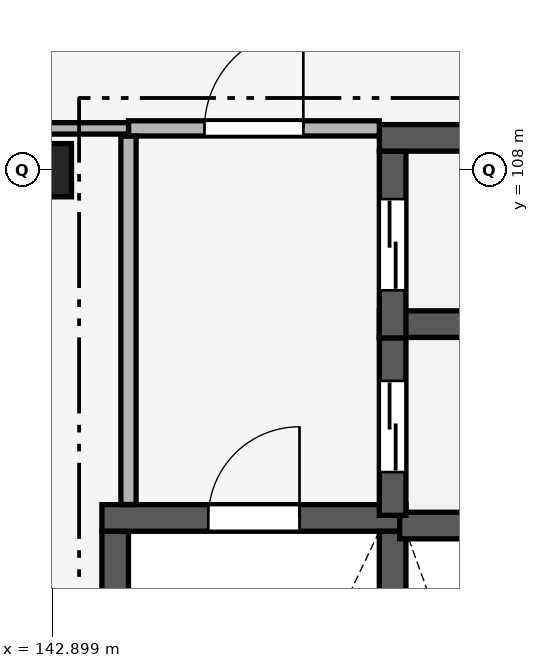
"""IFC4 building model, lengths in metres.
Left out: names, types, materials, properties, quantities, classifications, styles, units other than length and angle.
Written with IfcOpenShell. Run it as: python <this file> out.ifc"""

import sys

from ifc_helpers import new_model, si_unit, direction, frame, frame_2d, origin, origin_2d, place, context, subcontext, project, spatial, rectangle, extrude, element, fill, save


model = new_model("IFC4")
c1 = context("Model", 3, precision=1e-05, world=origin(), true_north=direction((0.0, 1.0)))
c2 = subcontext(c1, "Body", "Model", "MODEL_VIEW")
j1 = project(units=[si_unit("LENGTHUNIT", "METRE"), si_unit("PLANEANGLEUNIT", "RADIAN")], contexts=[c1])
p1 = place(None, origin())
s1 = spatial("IfcSite", under=j1, at=p1, CompositionType="ELEMENT")
p2 = place(p1, origin())
s2 = spatial("IfcBuilding", under=s1, at=p2, CompositionType="ELEMENT")
p3 = place(p2, frame((0.0, 0.0, 25.2)))
s3 = spatial("IfcBuildingStorey", under=s2, at=p3, CompositionType="ELEMENT", Elevation=25.2)
p4 = place(p3, frame((142.8, 108.0, 0.0), z_axis=(0.0, 0.0, 1.0), x_axis=(1.0, 0.0, 0.0)))
e1 = element("IfcColumn", 1, at=p4, inside=s3, PredefinedType="COLUMN", context=c2, shape_type="SweptSolid", body=[
    extrude(rectangle(XDim=0.7, YDim=0.7, at=origin_2d()), origin(), (0.0, 0.0, 1.0), 4.2),
])
p5 = place(p3, frame((143.55, 103.425, 0.0), z_axis=(0.0, 0.0, 1.0), x_axis=(1.0, 0.0, 0.0)))
e2 = element("IfcWall", 2, at=p5, inside=s3, PredefinedType="SHEAR", context=c2, shape_type="SweptSolid", body=[
    extrude(rectangle(XDim=4.0, YDim=0.35, at=frame_2d((2.0, 0.0))), origin(), (0.0, 0.0, 1.0), 3.95),
])
p6 = place(p5, frame((1.4, 0.0, 0.0)))
e3 = element("IfcOpeningElement", 3, at=p6, cuts=e2, PredefinedType="OPENING", context=c2, shape_type="SweptSolid", body=[
    extrude(rectangle(XDim=1.2, YDim=2.2, at=frame_2d((0.6, 1.1))), frame((0.0, 0.19, 0.0), z_axis=(0.0, -1.0, 0.0), x_axis=(1.0, 0.0, 0.0)), (0.0, 0.0, 1.0), 0.38),
])
for number, where, z_axis, x_axis in (
    (4, (143.725, 96.352, 0.0), (0.0, 0.0, 1.0), (0.0, 1.0, 0.0)),
    (5, (147.375, 96.352, 0.0), (0.0, 0.0, 1.0), (0.0, 1.0, 0.0)),
):
    element("IfcWall", number, at=place(p3, frame(where, z_axis=z_axis, x_axis=x_axis)), inside=s3, PredefinedType="SHEAR", context=c2, shape_type="SweptSolid", body=[
        extrude(rectangle(XDim=6.896, YDim=0.35, at=frame_2d((3.448, 0.0))), origin(), (0.0, 0.0, 1.0), 3.95),
    ])
p7 = place(p3, frame((147.468, 103.325, 0.0), z_axis=(0.0, 0.0, 1.0), x_axis=(1.0, 0.0, 0.0)))
e6 = element("IfcWall", 6, at=p7, inside=s3, PredefinedType="SHEAR", context=c2, shape_type="SweptSolid", body=[
    extrude(rectangle(XDim=2.932, YDim=0.35, at=frame_2d((1.466, 0.0))), origin(), (0.0, 0.0, 1.0), 3.95),
])
p8 = place(p3, frame((147.2, 105.975, 0.0), z_axis=(0.0, 0.0, 1.0), x_axis=(1.0, 0.0, 0.0)))
e7 = element("IfcWall", 7, at=p8, inside=s3, PredefinedType="SHEAR", context=c2, shape_type="SweptSolid", body=[
    extrude(rectangle(XDim=3.2, YDim=0.35, at=frame_2d((1.6, 0.0))), origin(), (0.0, 0.0, 1.0), 3.95),
])
p9 = place(p3, frame((147.375, 103.459, 0.0), z_axis=(0.0, 0.0, 1.0), x_axis=(0.0, 1.0, 0.0)))
e8 = element("IfcWall", 8, at=p9, inside=s3, PredefinedType="SHEAR", context=c2, shape_type="SweptSolid", body=[
    extrude(rectangle(XDim=2.339, YDim=0.35, at=frame_2d((1.169, 0.0))), origin(), (0.0, 0.0, 1.0), 3.95),
])
p10 = place(p9, frame((0.569, 0.0, 0.0)))
e9 = element("IfcOpeningElement", 9, at=p10, cuts=e8, PredefinedType="OPENING", context=c2, shape_type="SweptSolid", body=[
    extrude(rectangle(XDim=1.2, YDim=2.15, at=frame_2d((0.6, 1.075))), frame((0.0, 0.19, 0.0), z_axis=(0.0, -1.0, 0.0), x_axis=(1.0, 0.0, 0.0)), (0.0, 0.0, 1.0), 0.38),
])
p11 = place(p3, frame((147.2, 108.425, 0.0), z_axis=(0.0, 0.0, 1.0), x_axis=(1.0, 0.0, 0.0)))
e10 = element("IfcWall", 10, at=p11, inside=s3, PredefinedType="SHEAR", context=c2, shape_type="SweptSolid", body=[
    extrude(rectangle(XDim=3.661, YDim=0.35, at=frame_2d((1.831, 0.0))), origin(), (0.0, 0.0, 1.0), 3.95),
])
p12 = place(p3, frame((147.375, 105.793, 0.0), z_axis=(0.0, 0.0, 1.0), x_axis=(0.0, 1.0, 0.0)))
e11 = element("IfcWall", 11, at=p12, inside=s3, PredefinedType="SHEAR", context=c2, shape_type="SweptSolid", body=[
    extrude(rectangle(XDim=2.455, YDim=0.35, at=frame_2d((1.228, 0.0))), origin(), (0.0, 0.0, 1.0), 3.95),
])
p13 = place(p12, frame((0.627, 0.0, 0.0)))
e12 = element("IfcOpeningElement", 12, at=p13, cuts=e11, PredefinedType="OPENING", context=c2, shape_type="SweptSolid", body=[
    extrude(rectangle(XDim=1.2, YDim=2.15, at=frame_2d((0.6, 1.075))), frame((0.0, 0.19, 0.0), z_axis=(0.0, -1.0, 0.0), x_axis=(1.0, 0.0, 0.0)), (0.0, 0.0, 1.0), 0.38),
])
p14 = place(p3, frame((143.9, 108.55, 0.0), z_axis=(0.0, 0.0, 1.0), x_axis=(1.0, 0.0, 0.0)))
e13 = element("IfcWall", 13, at=p14, inside=s3, PredefinedType="PARTITIONING", context=c2, shape_type="SweptSolid", body=[
    extrude(rectangle(XDim=3.3, YDim=0.2, at=frame_2d((1.65, 0.0))), origin(), (0.0, 0.0, 1.0), 3.95),
])
p15 = place(p14, frame((1.0, 0.0, 0.0)))
e14 = element("IfcOpeningElement", 14, at=p15, cuts=e13, PredefinedType="OPENING", context=c2, shape_type="SweptSolid", body=[
    extrude(rectangle(XDim=1.3, YDim=2.2, at=frame_2d((0.65, 1.1))), frame((0.0, 0.115, 0.0), z_axis=(0.0, -1.0, 0.0), x_axis=(1.0, 0.0, 0.0)), (0.0, 0.0, 1.0), 0.23),
])
p16 = place(p3, frame((142.455, 108.55, 0.0), z_axis=(0.0, 0.0, 1.0), x_axis=(1.0, 0.0, 0.0)))
e15 = element("IfcWall", 15, at=p16, inside=s3, PredefinedType="PARTITIONING", context=c2, shape_type="SweptSolid", body=[
    extrude(rectangle(XDim=1.445, YDim=0.15, at=frame_2d((0.722, 0.0))), origin(), (0.0, 0.0, 1.0), 3.4),
])
p17 = place(p3, frame((143.9, 103.602, 0.0), z_axis=(0.0, 0.0, 1.0), x_axis=(0.0, 1.0, 0.0)))
e16 = element("IfcWall", 16, at=p17, inside=s3, PredefinedType="PARTITIONING", context=c2, shape_type="SweptSolid", body=[
    extrude(rectangle(XDim=4.846, YDim=0.2, at=frame_2d((2.423, 0.0))), origin(), (0.0, 0.0, 1.0), 3.95),
])
p18 = place(p6, origin())
e17 = element("IfcDoor", 17, at=p18, inside=s3, OperationType="SINGLE_SWING_RIGHT", PredefinedType="DOOR", context=c2, shape_type="SweptSolid", body=[
    extrude(rectangle(XDim=1.2, YDim=2.2, at=frame_2d((0.6, 1.1))), frame((0.0, 0.025, 0.0), z_axis=(0.0, -1.0, 0.0), x_axis=(1.0, 0.0, 0.0)), (0.0, 0.0, 1.0), 0.05),
])
fill(e3, e17)
p19 = place(p10, origin())
e18 = element("IfcDoor", 18, at=p19, inside=s3, OperationType="DOUBLE_DOOR_SLIDING", PredefinedType="DOOR", context=c2, shape_type="SweptSolid", body=[
    extrude(rectangle(XDim=1.2, YDim=2.15, at=frame_2d((0.6, 1.075))), frame((0.0, 0.025, 0.0), z_axis=(0.0, -1.0, 0.0), x_axis=(1.0, 0.0, 0.0)), (0.0, 0.0, 1.0), 0.05),
])
fill(e9, e18)
p20 = place(p13, origin())
e19 = element("IfcDoor", 19, at=p20, inside=s3, OperationType="DOUBLE_DOOR_SLIDING", PredefinedType="DOOR", context=c2, shape_type="SweptSolid", body=[
    extrude(rectangle(XDim=1.2, YDim=2.15, at=frame_2d((0.6, 1.075))), frame((0.0, 0.025, 0.0), z_axis=(0.0, -1.0, 0.0), x_axis=(1.0, 0.0, 0.0)), (0.0, 0.0, 1.0), 0.05),
])
fill(e12, e19)
p21 = place(p15, origin())
e20 = element("IfcDoor", 20, at=p21, inside=s3, OperationType="SINGLE_SWING_RIGHT", PredefinedType="DOOR", context=c2, shape_type="SweptSolid", body=[
    extrude(rectangle(XDim=1.3, YDim=2.2, at=frame_2d((0.65, 1.1))), frame((0.0, 0.025, 0.0), z_axis=(0.0, -1.0, 0.0), x_axis=(1.0, 0.0, 0.0)), (0.0, 0.0, 1.0), 0.05),
])
fill(e14, e20)
save(model, sys.argv[1])
